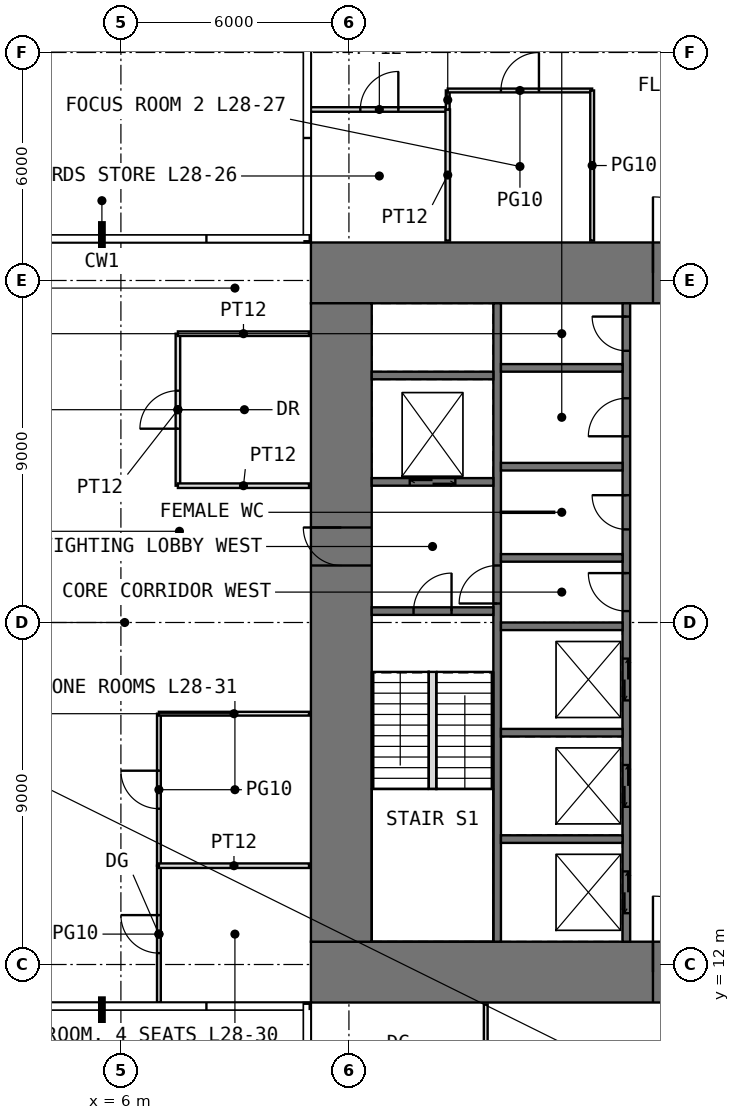
"""IFC4 building model, lengths in metres.
Left out: names, types, materials, properties, quantities, classifications, styles, units other than length and angle.
Written with IfcOpenShell. Run it as: python <this file> out.ifc"""

import sys

from ifc_helpers import new_model, si_unit, direction, frame, frame_2d, origin, place, context, subcontext, project, spatial, rectangle, extrude, element, fill, save


model = new_model("IFC4")
c1 = context("Model", 3, precision=1e-05, world=origin(), true_north=direction((0.0, 1.0)))
c2 = subcontext(c1, "Body", "Model", "MODEL_VIEW")
j1 = project(units=[si_unit("LENGTHUNIT", "METRE"), si_unit("PLANEANGLEUNIT", "RADIAN")], contexts=[c1])
p1 = place(None, origin())
s1 = spatial("IfcSite", under=j1, at=p1, CompositionType="ELEMENT")
p2 = place(p1, origin())
s2 = spatial("IfcBuilding", under=s1, at=p2, CompositionType="ELEMENT")
p3 = place(p2, frame((0.0, 0.0, 120.5)))
s3 = spatial("IfcBuildingStorey", under=s2, at=p3, CompositionType="ELEMENT", Elevation=120.5)
p4 = place(p3, frame((11.0, 11.8, -0.05), z_axis=(0.0, 0.0, 1.0), x_axis=(1.0, 0.0, 0.0)))
e1 = element("IfcWall", 1, at=p4, inside=s3, PredefinedType="SHEAR", context=c2, shape_type="SweptSolid", body=[
    extrude(rectangle(XDim=20.0, YDim=1.6, at=frame_2d((10.0, 0.0))), origin(), (0.0, 0.0, 1.0), 4.0),
])
p5 = place(p4, frame((9.0, 0.0, 0.05)))
e2 = element("IfcOpeningElement", 2, at=p5, cuts=e1, PredefinedType="OPENING", context=c2, shape_type="SweptSolid", body=[
    extrude(rectangle(XDim=2.0, YDim=2.2, at=frame_2d((1.0, 1.1))), frame((0.0, 0.81, 0.0), z_axis=(0.0, -1.0, 0.0), x_axis=(1.0, 0.0, 0.0)), (0.0, 0.0, 1.0), 1.62),
])
p6 = place(p3, frame((11.0, 30.2, -0.05), z_axis=(0.0, 0.0, 1.0), x_axis=(1.0, 0.0, 0.0)))
e3 = element("IfcWall", 3, at=p6, inside=s3, PredefinedType="SHEAR", context=c2, shape_type="SweptSolid", body=[
    extrude(rectangle(XDim=20.0, YDim=1.6, at=frame_2d((10.0, 0.0))), origin(), (0.0, 0.0, 1.0), 4.0),
])
p7 = place(p6, frame((9.0, 0.0, 0.05)))
e4 = element("IfcOpeningElement", 4, at=p7, cuts=e3, PredefinedType="OPENING", context=c2, shape_type="SweptSolid", body=[
    extrude(rectangle(XDim=2.0, YDim=2.2, at=frame_2d((1.0, 1.1))), frame((0.0, 0.81, 0.0), z_axis=(0.0, -1.0, 0.0), x_axis=(1.0, 0.0, 0.0)), (0.0, 0.0, 1.0), 1.62),
])
p8 = place(p3, frame((11.8, 12.6, -0.05), z_axis=(0.0, 0.0, 1.0), x_axis=(0.0, 1.0, 0.0)))
e5 = element("IfcWall", 5, at=p8, inside=s3, PredefinedType="SHEAR", context=c2, shape_type="SweptSolid", body=[
    extrude(rectangle(XDim=16.8, YDim=1.6, at=frame_2d((8.4, 0.0))), origin(), (0.0, 0.0, 1.0), 4.0),
])
p9 = place(p8, frame((9.9, 0.0, 0.05)))
e6 = element("IfcOpeningElement", 6, at=p9, cuts=e5, PredefinedType="OPENING", context=c2, shape_type="SweptSolid", body=[
    extrude(rectangle(XDim=1.0, YDim=2.2, at=frame_2d((0.5, 1.1))), frame((0.0, 0.81, 0.0), z_axis=(0.0, -1.0, 0.0), x_axis=(1.0, 0.0, 0.0)), (0.0, 0.0, 1.0), 1.62),
])
p10 = place(p3, frame((15.9, 12.6, -0.05), z_axis=(0.0, 0.0, 1.0), x_axis=(0.0, 1.0, 0.0)))
e7 = element("IfcWall", 7, at=p10, inside=s3, PredefinedType="SHEAR", context=c2, shape_type="SweptSolid", body=[
    extrude(rectangle(XDim=16.8, YDim=0.2, at=frame_2d((8.4, 0.0))), origin(), (0.0, 0.0, 1.0), 4.0),
])
p11 = place(p10, frame((8.9, 0.0, 0.05)))
e8 = element("IfcOpeningElement", 8, at=p11, cuts=e7, PredefinedType="OPENING", context=c2, shape_type="SweptSolid", body=[
    extrude(rectangle(XDim=1.0, YDim=2.2, at=frame_2d((0.5, 1.1))), frame((0.0, 0.11, 0.0), z_axis=(0.0, -1.0, 0.0), x_axis=(1.0, 0.0, 0.0)), (0.0, 0.0, 1.0), 0.22),
])
p12 = place(p3, frame((19.3, 12.6, -0.05), z_axis=(0.0, 0.0, 1.0), x_axis=(0.0, 1.0, 0.0)))
e9 = element("IfcWall", 9, at=p12, inside=s3, PredefinedType="SHEAR", context=c2, shape_type="SweptSolid", body=[
    extrude(rectangle(XDim=16.8, YDim=0.2, at=frame_2d((8.4, 0.0))), origin(), (0.0, 0.0, 1.0), 4.0),
])
p13 = place(p12, frame((8.7, 0.0, 0.05)))
e10 = element("IfcOpeningElement", 10, at=p13, cuts=e9, PredefinedType="OPENING", context=c2, shape_type="SweptSolid", body=[
    extrude(rectangle(XDim=1.0, YDim=2.2, at=frame_2d((0.5, 1.1))), frame((0.0, 0.11, 0.0), z_axis=(0.0, -1.0, 0.0), x_axis=(1.0, 0.0, 0.0)), (0.0, 0.0, 1.0), 0.22),
])
p14 = place(p12, frame((10.85, 0.0, 0.05)))
e11 = element("IfcOpeningElement", 11, at=p14, cuts=e9, PredefinedType="OPENING", context=c2, shape_type="SweptSolid", body=[
    extrude(rectangle(XDim=0.9, YDim=2.2, at=frame_2d((0.45, 1.1))), frame((0.0, 0.11, 0.0), z_axis=(0.0, -1.0, 0.0), x_axis=(1.0, 0.0, 0.0)), (0.0, 0.0, 1.0), 0.22),
])
p15 = place(p12, frame((13.3, 0.0, 0.05)))
e12 = element("IfcOpeningElement", 12, at=p15, cuts=e9, PredefinedType="OPENING", context=c2, shape_type="SweptSolid", body=[
    extrude(rectangle(XDim=1.0, YDim=2.2, at=frame_2d((0.5, 1.1))), frame((0.0, 0.11, 0.0), z_axis=(0.0, -1.0, 0.0), x_axis=(1.0, 0.0, 0.0)), (0.0, 0.0, 1.0), 0.22),
])
p16 = place(p12, frame((15.55, 0.0, 0.05)))
e13 = element("IfcOpeningElement", 13, at=p16, cuts=e9, PredefinedType="OPENING", context=c2, shape_type="SweptSolid", body=[
    extrude(rectangle(XDim=0.9, YDim=2.2, at=frame_2d((0.45, 1.1))), frame((0.0, 0.11, 0.0), z_axis=(0.0, -1.0, 0.0), x_axis=(1.0, 0.0, 0.0)), (0.0, 0.0, 1.0), 0.22),
])
p17 = place(p12, frame((0.75, 0.0, 0.05)))
e14 = element("IfcOpeningElement", 14, at=p17, cuts=e9, PredefinedType="OPENING", context=c2, shape_type="SweptSolid", body=[
    extrude(rectangle(XDim=1.1, YDim=2.2, at=frame_2d((0.55, 1.1))), frame((0.0, 0.11, 0.0), z_axis=(0.0, -1.0, 0.0), x_axis=(1.0, 0.0, 0.0)), (0.0, 0.0, 1.0), 0.22),
])
p18 = place(p12, frame((3.55, 0.0, 0.05)))
e15 = element("IfcOpeningElement", 15, at=p18, cuts=e9, PredefinedType="OPENING", context=c2, shape_type="SweptSolid", body=[
    extrude(rectangle(XDim=1.1, YDim=2.2, at=frame_2d((0.55, 1.1))), frame((0.0, 0.11, 0.0), z_axis=(0.0, -1.0, 0.0), x_axis=(1.0, 0.0, 0.0)), (0.0, 0.0, 1.0), 0.22),
])
p19 = place(p12, frame((6.35, 0.0, 0.05)))
e16 = element("IfcOpeningElement", 16, at=p19, cuts=e9, PredefinedType="OPENING", context=c2, shape_type="SweptSolid", body=[
    extrude(rectangle(XDim=1.1, YDim=2.2, at=frame_2d((0.55, 1.1))), frame((0.0, 0.11, 0.0), z_axis=(0.0, -1.0, 0.0), x_axis=(1.0, 0.0, 0.0)), (0.0, 0.0, 1.0), 0.22),
])
p20 = place(p3, frame((12.6, 21.3, -0.05), z_axis=(0.0, 0.0, 1.0), x_axis=(1.0, 0.0, 0.0)))
e17 = element("IfcWall", 17, at=p20, inside=s3, PredefinedType="SHEAR", context=c2, shape_type="SweptSolid", body=[
    extrude(rectangle(XDim=3.2, YDim=0.2, at=frame_2d((1.6, 0.0))), origin(), (0.0, 0.0, 1.0), 4.0),
])
p21 = place(p20, frame((1.1, 0.0, 0.05)))
e18 = element("IfcOpeningElement", 18, at=p21, cuts=e17, PredefinedType="OPENING", context=c2, shape_type="SweptSolid", body=[
    extrude(rectangle(XDim=1.0, YDim=2.2, at=frame_2d((0.5, 1.1))), frame((0.0, 0.11, 0.0), z_axis=(0.0, -1.0, 0.0), x_axis=(1.0, 0.0, 0.0)), (0.0, 0.0, 1.0), 0.22),
])
p22 = place(p3, frame((12.6, 24.7, -0.05), z_axis=(0.0, 0.0, 1.0), x_axis=(1.0, 0.0, 0.0)))
e19 = element("IfcWall", 19, at=p22, inside=s3, PredefinedType="SHEAR", context=c2, shape_type="SweptSolid", body=[
    extrude(rectangle(XDim=3.2, YDim=0.2, at=frame_2d((1.6, 0.0))), origin(), (0.0, 0.0, 1.0), 4.0),
])
p23 = place(p22, frame((1.0, 0.0, 0.05)))
e20 = element("IfcOpeningElement", 20, at=p23, cuts=e19, PredefinedType="OPENING", context=c2, shape_type="SweptSolid", body=[
    extrude(rectangle(XDim=1.2, YDim=2.2, at=frame_2d((0.6, 1.1))), frame((0.0, 0.11, 0.0), z_axis=(0.0, -1.0, 0.0), x_axis=(1.0, 0.0, 0.0)), (0.0, 0.0, 1.0), 0.22),
])
for number, where, z_axis, x_axis in (
    (21, (12.6, 27.5, -0.05), (0.0, 0.0, 1.0), (1.0, 0.0, 0.0)),
    (22, (16.0, 15.3, -0.05), (0.0, 0.0, 1.0), (1.0, 0.0, 0.0)),
    (23, (16.0, 18.1, -0.05), (0.0, 0.0, 1.0), (1.0, 0.0, 0.0)),
    (24, (16.0, 20.9, -0.05), (0.0, 0.0, 1.0), (1.0, 0.0, 0.0)),
    (25, (16.0, 22.7, -0.05), (0.0, 0.0, 1.0), (1.0, 0.0, 0.0)),
    (26, (16.0, 25.1, -0.05), (0.0, 0.0, 1.0), (1.0, 0.0, 0.0)),
    (27, (16.0, 27.7, -0.05), (0.0, 0.0, 1.0), (1.0, 0.0, 0.0)),
):
    element("IfcWall", number, at=place(p3, frame(where, z_axis=z_axis, x_axis=x_axis)), inside=s3, PredefinedType="SHEAR", context=c2, shape_type="SweptSolid", body=[
        extrude(rectangle(XDim=3.2, YDim=0.2, at=frame_2d((1.6, 0.0))), origin(), (0.0, 0.0, 1.0), 4.0),
    ])
p24 = place(p3, frame((16.0, 23.9, 0.0), z_axis=(0.0, 0.0, 1.0), x_axis=(1.0, 0.0, 0.0)))
e28 = element("IfcWall", 28, at=p24, inside=s3, PredefinedType="PARTITIONING", context=c2, shape_type="SweptSolid", body=[
    extrude(rectangle(XDim=1.4, YDim=0.03, at=frame_2d((0.7, 0.0))), origin(), (0.0, 0.0, 1.0), 3.75),
])
p25 = place(p3, frame((7.0, 11.0, 0.0), z_axis=(0.0, 0.0, 1.0), x_axis=(0.0, 1.0, 0.0)))
e29 = element("IfcWall", 29, at=p25, inside=s3, PredefinedType="PARTITIONING", context=c2, shape_type="SweptSolid", body=[
    extrude(rectangle(XDim=3.6, YDim=0.1, at=frame_2d((1.8, 0.0))), origin(), (0.0, 0.0, 1.0), 3.75),
])
p26 = place(p25, frame((1.3, 0.0, 0.0)))
e30 = element("IfcOpeningElement", 30, at=p26, cuts=e29, PredefinedType="OPENING", context=c2, shape_type="SweptSolid", body=[
    extrude(rectangle(XDim=1.0, YDim=2.4, at=frame_2d((0.5, 1.2))), frame((0.0, 0.06, 0.0), z_axis=(0.0, -1.0, 0.0), x_axis=(1.0, 0.0, 0.0)), (0.0, 0.0, 1.0), 0.12),
])
p27 = place(p3, frame((7.0, 14.6, 0.0), z_axis=(0.0, 0.0, 1.0), x_axis=(0.0, 1.0, 0.0)))
e31 = element("IfcWall", 31, at=p27, inside=s3, PredefinedType="PARTITIONING", context=c2, shape_type="SweptSolid", body=[
    extrude(rectangle(XDim=4.0, YDim=0.1, at=frame_2d((2.0, 0.0))), origin(), (0.0, 0.0, 1.0), 3.75),
])
p28 = place(p27, frame((1.5, 0.0, 0.0)))
e32 = element("IfcOpeningElement", 32, at=p28, cuts=e31, PredefinedType="OPENING", context=c2, shape_type="SweptSolid", body=[
    extrude(rectangle(XDim=1.0, YDim=2.4, at=frame_2d((0.5, 1.2))), frame((0.0, 0.06, 0.0), z_axis=(0.0, -1.0, 0.0), x_axis=(1.0, 0.0, 0.0)), (0.0, 0.0, 1.0), 0.12),
])
p29 = place(p3, frame((7.0, 14.6, 0.0), z_axis=(0.0, 0.0, 1.0), x_axis=(1.0, 0.0, 0.0)))
e33 = element("IfcWall", 33, at=p29, inside=s3, PredefinedType="PARTITIONING", context=c2, shape_type="SweptSolid", body=[
    extrude(rectangle(XDim=3.95, YDim=0.12, at=frame_2d((1.975, 0.0))), origin(), (0.0, 0.0, 1.0), 3.75),
])
p30 = place(p3, frame((7.0, 18.6, 0.0), z_axis=(0.0, 0.0, 1.0), x_axis=(1.0, 0.0, 0.0)))
e34 = element("IfcWall", 34, at=p30, inside=s3, PredefinedType="PARTITIONING", context=c2, shape_type="SweptSolid", body=[
    extrude(rectangle(XDim=3.95, YDim=0.1, at=frame_2d((1.975, 0.0))), origin(), (0.0, 0.0, 1.0), 3.75),
])
p31 = place(p3, frame((7.5, 24.6, 0.0), z_axis=(0.0, 0.0, 1.0), x_axis=(0.0, 1.0, 0.0)))
e35 = element("IfcWall", 35, at=p31, inside=s3, PredefinedType="PARTITIONING", context=c2, shape_type="SweptSolid", body=[
    extrude(rectangle(XDim=4.0, YDim=0.12, at=frame_2d((2.0, 0.0))), origin(), (0.0, 0.0, 1.0), 3.75),
])
p32 = place(p31, frame((1.5, 0.0, 0.0)))
e36 = element("IfcOpeningElement", 36, at=p32, cuts=e35, PredefinedType="OPENING", context=c2, shape_type="SweptSolid", body=[
    extrude(rectangle(XDim=1.0, YDim=2.2, at=frame_2d((0.5, 1.1))), frame((0.0, 0.07, 0.0), z_axis=(0.0, -1.0, 0.0), x_axis=(1.0, 0.0, 0.0)), (0.0, 0.0, 1.0), 0.14),
])
for number, where, z_axis, x_axis in (
    (37, (7.5, 24.6, 0.0), (0.0, 0.0, 1.0), (1.0, 0.0, 0.0)),
    (38, (7.5, 28.6, 0.0), (0.0, 0.0, 1.0), (1.0, 0.0, 0.0)),
):
    element("IfcWall", number, at=place(p3, frame(where, z_axis=z_axis, x_axis=x_axis)), inside=s3, PredefinedType="PARTITIONING", context=c2, shape_type="SweptSolid", body=[
        extrude(rectangle(XDim=3.45, YDim=0.12, at=frame_2d((1.725, 0.0))), origin(), (0.0, 0.0, 1.0), 3.75),
    ])
p33 = place(p3, frame((11.0, 34.5, 0.0), z_axis=(0.0, 0.0, 1.0), x_axis=(1.0, 0.0, 0.0)))
e39 = element("IfcWall", 39, at=p33, inside=s3, PredefinedType="PARTITIONING", context=c2, shape_type="SweptSolid", body=[
    extrude(rectangle(XDim=3.6, YDim=0.12, at=frame_2d((1.8, 0.0))), origin(), (0.0, 0.0, 1.0), 3.75),
])
p34 = place(p33, frame((1.3, 0.0, 0.0)))
e40 = element("IfcOpeningElement", 40, at=p34, cuts=e39, PredefinedType="OPENING", context=c2, shape_type="SweptSolid", body=[
    extrude(rectangle(XDim=1.0, YDim=2.2, at=frame_2d((0.5, 1.1))), frame((0.0, 0.07, 0.0), z_axis=(0.0, -1.0, 0.0), x_axis=(1.0, 0.0, 0.0)), (0.0, 0.0, 1.0), 0.14),
])
p35 = place(p3, frame((14.6, 31.05, 0.0), z_axis=(0.0, 0.0, 1.0), x_axis=(0.0, 1.0, 0.0)))
e41 = element("IfcWall", 41, at=p35, inside=s3, PredefinedType="PARTITIONING", context=c2, shape_type="SweptSolid", body=[
    extrude(rectangle(XDim=3.45, YDim=0.12, at=frame_2d((1.725, 0.0))), origin(), (0.0, 0.0, 1.0), 3.75),
])
p36 = place(p3, frame((14.6, 34.5, 0.0), z_axis=(0.0, 0.0, 1.0), x_axis=(0.0, 1.0, 0.0)))
e42 = element("IfcWall", 42, at=p36, inside=s3, PredefinedType="PARTITIONING", context=c2, shape_type="SweptSolid", body=[
    extrude(rectangle(XDim=0.5, YDim=0.1, at=frame_2d((0.25, 0.0))), origin(), (0.0, 0.0, 1.0), 3.75),
])
p37 = place(p3, frame((14.6, 35.0, 0.0), z_axis=(0.0, 0.0, 1.0), x_axis=(1.0, 0.0, 0.0)))
e43 = element("IfcWall", 43, at=p37, inside=s3, PredefinedType="PARTITIONING", context=c2, shape_type="SweptSolid", body=[
    extrude(rectangle(XDim=3.8, YDim=0.1, at=frame_2d((1.9, 0.0))), origin(), (0.0, 0.0, 1.0), 3.75),
])
p38 = place(p37, frame((1.4, 0.0, 0.0)))
e44 = element("IfcOpeningElement", 44, at=p38, cuts=e43, PredefinedType="OPENING", context=c2, shape_type="SweptSolid", body=[
    extrude(rectangle(XDim=1.0, YDim=2.4, at=frame_2d((0.5, 1.2))), frame((0.0, 0.06, 0.0), z_axis=(0.0, -1.0, 0.0), x_axis=(1.0, 0.0, 0.0)), (0.0, 0.0, 1.0), 0.12),
])
for number, where, z_axis, x_axis in (
    (45, (15.6, 7.0, 0.0), (0.0, 0.0, 1.0), (0.0, 1.0, 0.0)),
    (46, (18.4, 31.05, 0.0), (0.0, 0.0, 1.0), (0.0, 1.0, 0.0)),
):
    element("IfcWall", number, at=place(p3, frame(where, z_axis=z_axis, x_axis=x_axis)), inside=s3, PredefinedType="PARTITIONING", context=c2, shape_type="SweptSolid", body=[
        extrude(rectangle(XDim=3.95, YDim=0.1, at=frame_2d((1.975, 0.0))), origin(), (0.0, 0.0, 1.0), 3.75),
    ])
p39 = place(p3, frame((14.2, 16.62, 0.0), z_axis=(0.0, 0.0, 1.0), x_axis=(0.0, 1.0, 0.0)))
e47 = element("IfcWall", 47, at=p39, inside=s3, PredefinedType="PARTITIONING", context=c2, shape_type="SweptSolid", body=[
    extrude(rectangle(XDim=3.08, YDim=0.2, at=frame_2d((1.54, 0.0))), origin(), (0.0, 0.0, 1.0), 4.0),
])
p40 = place(p5, origin())
e48 = element("IfcDoor", 48, at=p40, inside=s3, OperationType="DOUBLE_DOOR_SINGLE_SWING", PredefinedType="DOOR", context=c2, shape_type="SweptSolid", body=[
    extrude(rectangle(XDim=2.0, YDim=2.2, at=frame_2d((1.0, 1.1))), frame((0.0, 0.025, 0.0), z_axis=(0.0, -1.0, 0.0), x_axis=(1.0, 0.0, 0.0)), (0.0, 0.0, 1.0), 0.05),
])
fill(e2, e48)
p41 = place(p7, origin())
e49 = element("IfcDoor", 49, at=p41, inside=s3, OperationType="DOUBLE_DOOR_SINGLE_SWING", PredefinedType="DOOR", context=c2, shape_type="SweptSolid", body=[
    extrude(rectangle(XDim=2.0, YDim=2.2, at=frame_2d((1.0, 1.1))), frame((0.0, 0.025, 0.0), z_axis=(0.0, -1.0, 0.0), x_axis=(1.0, 0.0, 0.0)), (0.0, 0.0, 1.0), 0.05),
])
fill(e4, e49)
p42 = place(p9, origin())
e50 = element("IfcDoor", 50, at=p42, inside=s3, OperationType="SINGLE_SWING_RIGHT", PredefinedType="DOOR", context=c2, shape_type="SweptSolid", body=[
    extrude(rectangle(XDim=1.0, YDim=2.2, at=frame_2d((0.5, 1.1))), frame((0.0, 0.025, 0.0), z_axis=(0.0, -1.0, 0.0), x_axis=(1.0, 0.0, 0.0)), (0.0, 0.0, 1.0), 0.05),
])
fill(e6, e50)
p43 = place(p21, origin())
e51 = element("IfcDoor", 51, at=p43, inside=s3, OperationType="SINGLE_SWING_RIGHT", PredefinedType="DOOR", context=c2, shape_type="SweptSolid", body=[
    extrude(rectangle(XDim=1.0, YDim=2.2, at=frame_2d((0.5, 1.1))), frame((0.0, 0.025, 0.0), z_axis=(0.0, -1.0, 0.0), x_axis=(1.0, 0.0, 0.0)), (0.0, 0.0, 1.0), 0.05),
])
fill(e18, e51)
p44 = place(p11, origin())
e52 = element("IfcDoor", 52, at=p44, inside=s3, OperationType="SINGLE_SWING_LEFT", PredefinedType="DOOR", context=c2, shape_type="SweptSolid", body=[
    extrude(rectangle(XDim=1.0, YDim=2.2, at=frame_2d((0.5, 1.1))), frame((0.0, 0.025, 0.0), z_axis=(0.0, -1.0, 0.0), x_axis=(1.0, 0.0, 0.0)), (0.0, 0.0, 1.0), 0.05),
])
fill(e8, e52)
p45 = place(p13, origin())
e53 = element("IfcDoor", 53, at=p45, inside=s3, OperationType="SINGLE_SWING_RIGHT", PredefinedType="DOOR", context=c2, shape_type="SweptSolid", body=[
    extrude(rectangle(XDim=1.0, YDim=2.2, at=frame_2d((0.5, 1.1))), frame((0.0, 0.025, 0.0), z_axis=(0.0, -1.0, 0.0), x_axis=(1.0, 0.0, 0.0)), (0.0, 0.0, 1.0), 0.05),
])
fill(e10, e53)
p46 = place(p14, origin())
e54 = element("IfcDoor", 54, at=p46, inside=s3, OperationType="SINGLE_SWING_RIGHT", PredefinedType="DOOR", context=c2, shape_type="SweptSolid", body=[
    extrude(rectangle(XDim=0.9, YDim=2.2, at=frame_2d((0.45, 1.1))), frame((0.0, 0.025, 0.0), z_axis=(0.0, -1.0, 0.0), x_axis=(1.0, 0.0, 0.0)), (0.0, 0.0, 1.0), 0.05),
])
fill(e11, e54)
p47 = place(p15, origin())
e55 = element("IfcDoor", 55, at=p47, inside=s3, OperationType="SINGLE_SWING_LEFT", PredefinedType="DOOR", context=c2, shape_type="SweptSolid", body=[
    extrude(rectangle(XDim=1.0, YDim=2.2, at=frame_2d((0.5, 1.1))), frame((0.0, 0.025, 0.0), z_axis=(0.0, -1.0, 0.0), x_axis=(1.0, 0.0, 0.0)), (0.0, 0.0, 1.0), 0.05),
])
fill(e12, e55)
p48 = place(p16, origin())
e56 = element("IfcDoor", 56, at=p48, inside=s3, OperationType="SINGLE_SWING_RIGHT", PredefinedType="DOOR", context=c2, shape_type="SweptSolid", body=[
    extrude(rectangle(XDim=0.9, YDim=2.2, at=frame_2d((0.45, 1.1))), frame((0.0, 0.025, 0.0), z_axis=(0.0, -1.0, 0.0), x_axis=(1.0, 0.0, 0.0)), (0.0, 0.0, 1.0), 0.05),
])
fill(e13, e56)
p49 = place(p34, origin())
e57 = element("IfcDoor", 57, at=p49, inside=s3, OperationType="SINGLE_SWING_RIGHT", PredefinedType="DOOR", context=c2, shape_type="SweptSolid", body=[
    extrude(rectangle(XDim=1.0, YDim=2.2, at=frame_2d((0.5, 1.1))), frame((0.0, 0.025, 0.0), z_axis=(0.0, -1.0, 0.0), x_axis=(1.0, 0.0, 0.0)), (0.0, 0.0, 1.0), 0.05),
])
fill(e40, e57)
p50 = place(p38, origin())
e58 = element("IfcDoor", 58, at=p50, inside=s3, OperationType="SINGLE_SWING_RIGHT", PredefinedType="DOOR", context=c2, shape_type="SweptSolid", body=[
    extrude(rectangle(XDim=1.0, YDim=2.4, at=frame_2d((0.5, 1.2))), frame((0.0, 0.025, 0.0), z_axis=(0.0, -1.0, 0.0), x_axis=(1.0, 0.0, 0.0)), (0.0, 0.0, 1.0), 0.05),
])
fill(e44, e58)
p51 = place(p26, origin())
e59 = element("IfcDoor", 59, at=p51, inside=s3, OperationType="SINGLE_SWING_RIGHT", PredefinedType="DOOR", context=c2, shape_type="SweptSolid", body=[
    extrude(rectangle(XDim=1.0, YDim=2.4, at=frame_2d((0.5, 1.2))), frame((0.0, 0.025, 0.0), z_axis=(0.0, -1.0, 0.0), x_axis=(1.0, 0.0, 0.0)), (0.0, 0.0, 1.0), 0.05),
])
fill(e30, e59)
p52 = place(p28, origin())
e60 = element("IfcDoor", 60, at=p52, inside=s3, OperationType="SINGLE_SWING_RIGHT", PredefinedType="DOOR", context=c2, shape_type="SweptSolid", body=[
    extrude(rectangle(XDim=1.0, YDim=2.4, at=frame_2d((0.5, 1.2))), frame((0.0, 0.025, 0.0), z_axis=(0.0, -1.0, 0.0), x_axis=(1.0, 0.0, 0.0)), (0.0, 0.0, 1.0), 0.05),
])
fill(e32, e60)
p53 = place(p32, origin())
e61 = element("IfcDoor", 61, at=p53, inside=s3, OperationType="SINGLE_SWING_LEFT", PredefinedType="DOOR", context=c2, shape_type="SweptSolid", body=[
    extrude(rectangle(XDim=1.0, YDim=2.2, at=frame_2d((0.5, 1.1))), frame((0.0, 0.025, 0.0), z_axis=(0.0, -1.0, 0.0), x_axis=(1.0, 0.0, 0.0)), (0.0, 0.0, 1.0), 0.05),
])
fill(e36, e61)
p54 = place(p17, origin())
e62 = element("IfcDoor", 62, at=p54, inside=s3, OperationType="DOUBLE_DOOR_SLIDING", PredefinedType="DOOR", context=c2, shape_type="SweptSolid", body=[
    extrude(rectangle(XDim=1.1, YDim=2.2, at=frame_2d((0.55, 1.1))), frame((0.0, 0.025, 0.0), z_axis=(0.0, -1.0, 0.0), x_axis=(1.0, 0.0, 0.0)), (0.0, 0.0, 1.0), 0.05),
])
fill(e14, e62)
p55 = place(p18, origin())
e63 = element("IfcDoor", 63, at=p55, inside=s3, OperationType="DOUBLE_DOOR_SLIDING", PredefinedType="DOOR", context=c2, shape_type="SweptSolid", body=[
    extrude(rectangle(XDim=1.1, YDim=2.2, at=frame_2d((0.55, 1.1))), frame((0.0, 0.025, 0.0), z_axis=(0.0, -1.0, 0.0), x_axis=(1.0, 0.0, 0.0)), (0.0, 0.0, 1.0), 0.05),
])
fill(e15, e63)
p56 = place(p19, origin())
e64 = element("IfcDoor", 64, at=p56, inside=s3, OperationType="DOUBLE_DOOR_SLIDING", PredefinedType="DOOR", context=c2, shape_type="SweptSolid", body=[
    extrude(rectangle(XDim=1.1, YDim=2.2, at=frame_2d((0.55, 1.1))), frame((0.0, 0.025, 0.0), z_axis=(0.0, -1.0, 0.0), x_axis=(1.0, 0.0, 0.0)), (0.0, 0.0, 1.0), 0.05),
])
fill(e16, e64)
p57 = place(p23, origin())
e65 = element("IfcDoor", 65, at=p57, inside=s3, OperationType="DOUBLE_DOOR_SLIDING", PredefinedType="DOOR", context=c2, shape_type="SweptSolid", body=[
    extrude(rectangle(XDim=1.2, YDim=2.2, at=frame_2d((0.6, 1.1))), frame((0.0, 0.025, 0.0), z_axis=(0.0, -1.0, 0.0), x_axis=(1.0, 0.0, 0.0)), (0.0, 0.0, 1.0), 0.05),
])
fill(e20, e65)
save(model, sys.argv[1])
